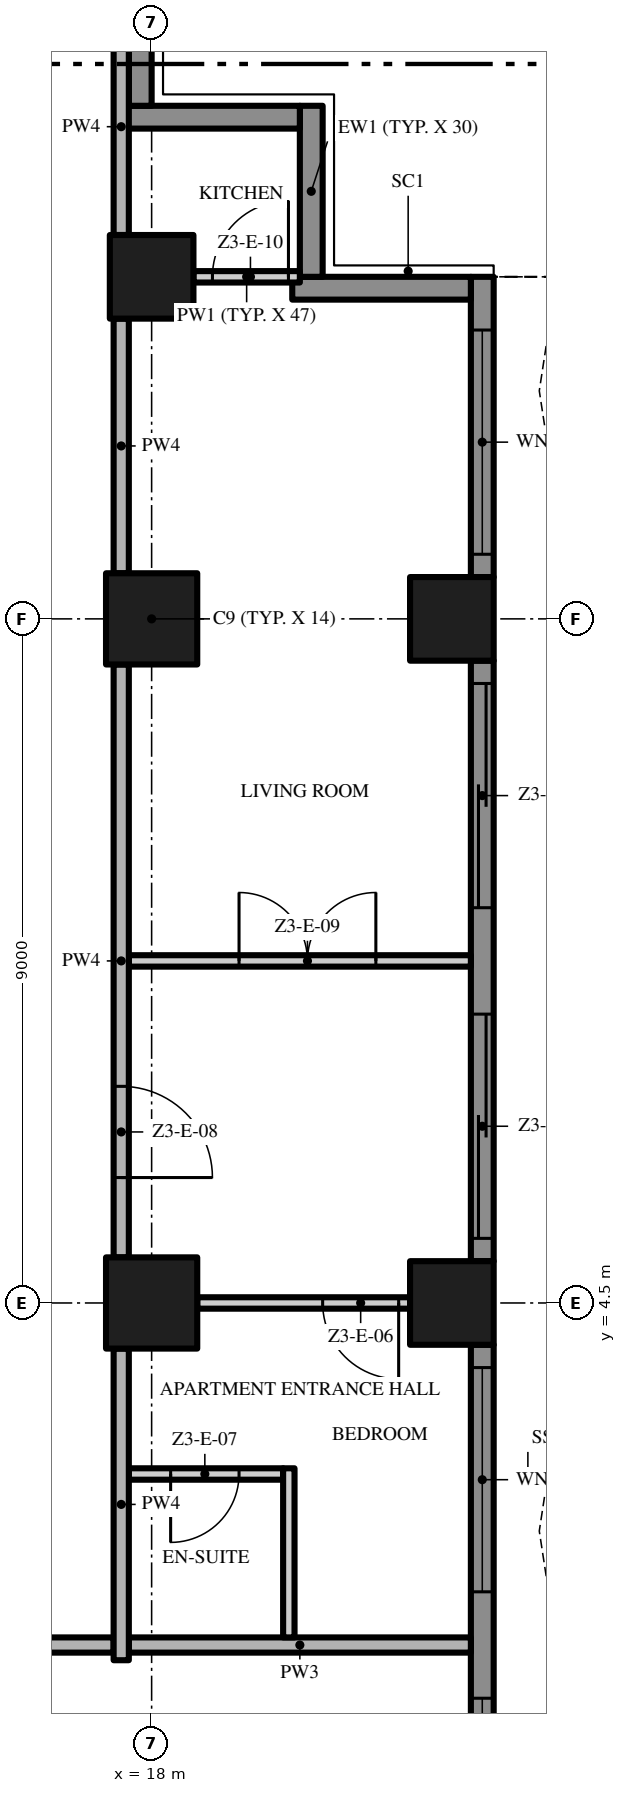
"""IFC4 building model, lengths in metres.
Left out: names, types, materials, properties, quantities, classifications, styles, units other than length and angle.
Written with IfcOpenShell. Run it as: python <this file> out.ifc"""

import sys

from ifc_helpers import new_model, si_unit, direction, frame, frame_2d, origin, origin_2d, place, context, subcontext, project, spatial, polyline, rectangle, outline, extrude, element, fill, save


model = new_model("IFC4")
c1 = context("Model", 3, precision=1e-05, world=origin(), true_north=direction((0.0, 1.0)))
c2 = subcontext(c1, "Body", "Model", "MODEL_VIEW")
j1 = project(units=[si_unit("LENGTHUNIT", "METRE"), si_unit("PLANEANGLEUNIT", "RADIAN")], contexts=[c1])
p1 = place(None, origin())
s1 = spatial("IfcSite", under=j1, at=p1, CompositionType="ELEMENT")
p2 = place(p1, origin())
s2 = spatial("IfcBuilding", under=s1, at=p2, CompositionType="ELEMENT")
p3 = place(p2, frame((0.0, 0.0, 166.8)))
s3 = spatial("IfcBuildingStorey", under=s2, at=p3, CompositionType="ELEMENT", Elevation=166.8)
for number, where, z_axis, x_axis in (
    (1, (18.0, 13.5, 0.0), (0.0, 0.0, 1.0), (1.0, 0.0, 0.0)),
    (2, (18.0, 4.5, 0.0), (0.0, 0.0, 1.0), (1.0, 0.0, 0.0)),
):
    element("IfcColumn", number, at=place(p3, frame(where, z_axis=z_axis, x_axis=x_axis)), inside=s3, PredefinedType="COLUMN", context=c2, shape_type="SweptSolid", body=[
        extrude(rectangle(XDim=1.2, YDim=1.2, at=origin_2d()), origin(), (0.0, 0.0, 1.0), 3.5),
    ])
for number, where, z_axis, x_axis in (
    (3, (21.95, 13.5, 0.0), (0.0, 0.0, 1.0), (1.0, 0.0, 0.0)),
    (4, (18.0, 18.0, 0.0), (0.0, 0.0, 1.0), (1.0, 0.0, 0.0)),
    (5, (21.95, 4.5, 0.0), (0.0, 0.0, 1.0), (1.0, 0.0, 0.0)),
):
    element("IfcColumn", number, at=place(p3, frame(where, z_axis=z_axis, x_axis=x_axis)), inside=s3, PredefinedType="COLUMN", context=c2, shape_type="SweptSolid", body=[
        extrude(rectangle(XDim=1.1, YDim=1.1, at=origin_2d()), origin(), (0.0, 0.0, 1.0), 3.5),
    ])
p4 = place(p3, frame((22.35, 3.95, 0.0), z_axis=(0.0, 0.0, 1.0), x_axis=(0.0, -1.0, 0.0)))
e6 = element("IfcWall", 6, at=p4, inside=s3, PredefinedType="SOLIDWALL", context=c2, shape_type="SweptSolid", body=[
    extrude(rectangle(XDim=7.9, YDim=0.3, at=frame_2d((3.95, 0.0))), origin(), (0.0, 0.0, 1.0), 3.5),
])
p5 = place(p4, frame((4.65, 0.0, 0.45)))
e7 = element("IfcOpeningElement", 7, at=p5, cuts=e6, PredefinedType="OPENING", context=c2, shape_type="SweptSolid", body=[
    extrude(rectangle(XDim=2.95, YDim=2.65, at=frame_2d((1.475, 1.325))), frame((0.0, 0.16, 0.0), z_axis=(0.0, -1.0, 0.0), x_axis=(1.0, 0.0, 0.0)), (0.0, 0.0, 1.0), 0.32),
])
p6 = place(p4, frame((0.3, 0.0, 0.45)))
e8 = element("IfcOpeningElement", 8, at=p6, cuts=e6, PredefinedType="OPENING", context=c2, shape_type="SweptSolid", body=[
    extrude(rectangle(XDim=2.95, YDim=2.65, at=frame_2d((1.475, 1.325))), frame((0.0, 0.16, 0.0), z_axis=(0.0, -1.0, 0.0), x_axis=(1.0, 0.0, 0.0)), (0.0, 0.0, 1.0), 0.32),
])
p7 = place(p3, frame((22.35, 12.95, 0.0), z_axis=(0.0, 0.0, 1.0), x_axis=(0.0, -1.0, 0.0)))
e9 = element("IfcWall", 9, at=p7, inside=s3, PredefinedType="SOLIDWALL", context=c2, shape_type="SweptSolid", body=[
    extrude(rectangle(XDim=7.9, YDim=0.3, at=frame_2d((3.95, 0.0))), origin(), (0.0, 0.0, 1.0), 3.5),
])
p8 = place(p7, frame((4.65, 0.0, 0.0)))
e10 = element("IfcOpeningElement", 10, at=p8, cuts=e9, PredefinedType="OPENING", context=c2, shape_type="SweptSolid", body=[
    extrude(rectangle(XDim=2.95, YDim=2.4, at=frame_2d((1.475, 1.2))), frame((0.0, 0.16, 0.0), z_axis=(0.0, -1.0, 0.0), x_axis=(1.0, 0.0, 0.0)), (0.0, 0.0, 1.0), 0.32),
])
p9 = place(p7, frame((0.3, 0.0, 0.0)))
e11 = element("IfcOpeningElement", 11, at=p9, cuts=e9, PredefinedType="OPENING", context=c2, shape_type="SweptSolid", body=[
    extrude(rectangle(XDim=2.95, YDim=2.4, at=frame_2d((1.475, 1.2))), frame((0.0, 0.16, 0.0), z_axis=(0.0, -1.0, 0.0), x_axis=(1.0, 0.0, 0.0)), (0.0, 0.0, 1.0), 0.32),
])
p10 = place(p3, frame((22.35, 18.0, 0.0), z_axis=(0.0, 0.0, 1.0), x_axis=(0.0, -1.0, 0.0)))
e12 = element("IfcWall", 12, at=p10, inside=s3, PredefinedType="SOLIDWALL", context=c2, shape_type="SweptSolid", body=[
    extrude(rectangle(XDim=3.95, YDim=0.3, at=frame_2d((1.975, 0.0))), origin(), (0.0, 0.0, 1.0), 3.5),
])
p11 = place(p10, frame((0.7, 0.0, 0.45)))
e13 = element("IfcOpeningElement", 13, at=p11, cuts=e12, PredefinedType="OPENING", context=c2, shape_type="SweptSolid", body=[
    extrude(rectangle(XDim=2.95, YDim=2.65, at=frame_2d((1.475, 1.325))), frame((0.0, 0.16, 0.0), z_axis=(0.0, -1.0, 0.0), x_axis=(1.0, 0.0, 0.0)), (0.0, 0.0, 1.0), 0.32),
])
p12 = place(p3, frame((19.85, 17.85, 0.0), z_axis=(0.0, 0.0, 1.0), x_axis=(1.0, 0.0, 0.0)))
e14 = element("IfcWall", 14, at=p12, inside=s3, PredefinedType="SOLIDWALL", context=c2, shape_type="SweptSolid", body=[
    extrude(rectangle(XDim=2.35, YDim=0.3, at=frame_2d((1.175, 0.0))), origin(), (0.0, 0.0, 1.0), 3.5),
])
p13 = place(p3, frame((20.1, 20.25, 0.0), z_axis=(0.0, 0.0, 1.0), x_axis=(0.0, -1.0, 0.0)))
e15 = element("IfcWall", 15, at=p13, inside=s3, PredefinedType="SOLIDWALL", context=c2, shape_type="SweptSolid", body=[
    extrude(rectangle(XDim=2.25, YDim=0.3, at=frame_2d((1.125, 0.0))), origin(), (0.0, 0.0, 1.0), 3.5),
])
p14 = place(p3, frame((17.6, 20.1, 0.0), z_axis=(0.0, 0.0, 1.0), x_axis=(1.0, 0.0, 0.0)))
e16 = element("IfcWall", 16, at=p14, inside=s3, PredefinedType="SOLIDWALL", context=c2, shape_type="SweptSolid", body=[
    extrude(rectangle(XDim=2.35, YDim=0.3, at=frame_2d((1.175, 0.0))), origin(), (0.0, 0.0, 1.0), 3.5),
])
p15 = place(p3, frame((17.85, 21.4, 0.0), z_axis=(0.0, 0.0, 1.0), x_axis=(0.0, -1.0, 0.0)))
e17 = element("IfcWall", 17, at=p15, inside=s3, PredefinedType="SOLIDWALL", context=c2, shape_type="SweptSolid", body=[
    extrude(rectangle(XDim=1.15, YDim=0.3, at=frame_2d((0.575, 0.0))), origin(), (0.0, 0.0, 1.0), 3.5),
])
p16 = place(p3, origin())
e18 = element("IfcWall", 18, at=p16, inside=s3, PredefinedType="USERDEFINED", context=c2, shape_type="SweptSolid", body=[
    extrude(outline(polyline([(23.1, -13.5), (23.329, -12.0), (23.929, -10.5), (24.671, -9.0), (25.271, -7.5), (25.5, -6.0), (25.271, -4.5), (24.671, -3.0), (23.929, -1.5), (23.329, 0.0), (23.1, 1.5), (23.329, 3.0), (23.929, 4.5), (24.671, 6.0), (25.271, 7.5), (25.5, 9.0), (25.271, 10.5), (24.671, 12.0), (23.929, 13.5), (23.329, 15.0), (23.1, 16.5), (23.329, 18.0), (23.082, 18.038), (22.847, 16.5), (23.086, 14.934), (23.701, 13.398), (24.442, 11.898), (25.028, 10.434), (25.247, 9.0), (25.028, 7.566), (24.442, 6.102), (23.701, 4.602), (23.086, 3.066), (22.847, 1.5), (23.086, -0.066), (23.701, -1.602), (24.442, -3.102), (25.028, -4.566), (25.247, -6.0), (25.028, -7.434), (24.442, -8.898), (23.701, -10.398), (23.086, -11.934), (22.853, -13.462), (23.1, -13.5)])), origin(), (0.0, 0.0, 1.0), 0.9),
])
p17 = place(p3, frame((17.5, 0.0, 0.0), z_axis=(0.0, 0.0, 1.0), x_axis=(-1.0, 0.0, 0.0)))
e19 = element("IfcWall", 19, at=p17, inside=s3, PredefinedType="PARTITIONING", context=c2, shape_type="SweptSolid", body=[
    extrude(rectangle(XDim=35.0, YDim=0.2, at=frame_2d((17.5, 0.0))), origin(), (0.0, 0.0, 1.0), 3.5),
])
p18 = place(p17, frame((16.75, 0.0, 0.0)))
e20 = element("IfcOpeningElement", 20, at=p18, cuts=e19, PredefinedType="OPENING", context=c2, shape_type="SweptSolid", body=[
    extrude(rectangle(XDim=1.5, YDim=2.4, at=frame_2d((0.75, 1.2))), frame((0.0, 0.11, 0.0), z_axis=(0.0, -1.0, 0.0), x_axis=(1.0, 0.0, 0.0)), (0.0, 0.0, 1.0), 0.22),
])
p19 = place(p3, frame((17.7, 0.0, 0.0), z_axis=(0.0, 0.0, 1.0), x_axis=(1.0, 0.0, 0.0)))
e21 = element("IfcWall", 21, at=p19, inside=s3, PredefinedType="PARTITIONING", context=c2, shape_type="SweptSolid", body=[
    extrude(rectangle(XDim=4.5, YDim=0.2, at=frame_2d((2.25, 0.0))), origin(), (0.0, 0.0, 1.0), 3.5),
])
p20 = place(p3, frame((19.73, 2.25, 0.0), z_axis=(0.0, 0.0, 1.0), x_axis=(-1.0, 0.0, 0.0)))
e22 = element("IfcWall", 22, at=p20, inside=s3, PredefinedType="PARTITIONING", context=c2, shape_type="SweptSolid", body=[
    extrude(rectangle(XDim=2.03, YDim=0.15, at=frame_2d((1.015, 0.0))), origin(), (0.0, 0.0, 1.0), 3.5),
])
p21 = place(p20, frame((0.58, 0.0, 0.0)))
e23 = element("IfcOpeningElement", 23, at=p21, cuts=e22, PredefinedType="OPENING", context=c2, shape_type="SweptSolid", body=[
    extrude(rectangle(XDim=0.9, YDim=2.1, at=frame_2d((0.45, 1.05))), frame((0.0, 0.085, 0.0), z_axis=(0.0, -1.0, 0.0), x_axis=(1.0, 0.0, 0.0)), (0.0, 0.0, 1.0), 0.17),
])
p22 = place(p3, frame((21.4, 4.5, 0.0), z_axis=(0.0, 0.0, 1.0), x_axis=(-1.0, 0.0, 0.0)))
e24 = element("IfcWall", 24, at=p22, inside=s3, PredefinedType="PARTITIONING", context=c2, shape_type="SweptSolid", body=[
    extrude(rectangle(XDim=2.8, YDim=0.15, at=frame_2d((1.4, 0.0))), origin(), (0.0, 0.0, 1.0), 3.5),
])
p23 = place(p22, frame((0.15, 0.0, 0.0)))
e25 = element("IfcOpeningElement", 25, at=p23, cuts=e24, PredefinedType="OPENING", context=c2, shape_type="SweptSolid", body=[
    extrude(rectangle(XDim=1.0, YDim=2.4, at=frame_2d((0.5, 1.2))), frame((0.0, 0.085, 0.0), z_axis=(0.0, -1.0, 0.0), x_axis=(1.0, 0.0, 0.0)), (0.0, 0.0, 1.0), 0.17),
])
p24 = place(p3, frame((17.7, 9.0, 0.0), z_axis=(0.0, 0.0, 1.0), x_axis=(1.0, 0.0, 0.0)))
e26 = element("IfcWall", 26, at=p24, inside=s3, PredefinedType="PARTITIONING", context=c2, shape_type="SweptSolid", body=[
    extrude(rectangle(XDim=4.5, YDim=0.15, at=frame_2d((2.25, 0.0))), origin(), (0.0, 0.0, 1.0), 3.5),
])
p25 = place(p24, frame((1.45, 0.0, 0.0)))
e27 = element("IfcOpeningElement", 27, at=p25, cuts=e26, PredefinedType="OPENING", context=c2, shape_type="SweptSolid", body=[
    extrude(rectangle(XDim=1.8, YDim=2.4, at=frame_2d((0.9, 1.2))), frame((0.0, 0.085, 0.0), z_axis=(0.0, -1.0, 0.0), x_axis=(1.0, 0.0, 0.0)), (0.0, 0.0, 1.0), 0.17),
])
p26 = place(p3, frame((18.55, 18.0, 0.0), z_axis=(0.0, 0.0, 1.0), x_axis=(1.0, 0.0, 0.0)))
e28 = element("IfcWall", 28, at=p26, inside=s3, PredefinedType="PARTITIONING", context=c2, shape_type="SweptSolid", body=[
    extrude(rectangle(XDim=1.4, YDim=0.15, at=frame_2d((0.7, 0.0))), origin(), (0.0, 0.0, 1.0), 3.5),
])
p27 = place(p26, frame((0.25, 0.0, 0.0)))
e29 = element("IfcOpeningElement", 29, at=p27, cuts=e28, PredefinedType="OPENING", context=c2, shape_type="SweptSolid", body=[
    extrude(rectangle(XDim=1.0, YDim=2.4, at=frame_2d((0.5, 1.2))), frame((0.0, 0.085, 0.0), z_axis=(0.0, -1.0, 0.0), x_axis=(1.0, 0.0, 0.0)), (0.0, 0.0, 1.0), 0.17),
])
p28 = place(p3, frame((17.6, -0.2, 0.0), z_axis=(0.0, 0.0, 1.0), x_axis=(0.0, 1.0, 0.0)))
e30 = element("IfcWall", 30, at=p28, inside=s3, PredefinedType="PARTITIONING", context=c2, shape_type="SweptSolid", body=[
    extrude(rectangle(XDim=4.1, YDim=0.2, at=frame_2d((2.05, 0.0))), origin(), (0.0, 0.0, 1.0), 3.5),
])
p29 = place(p3, frame((17.6, 12.9, 0.0), z_axis=(0.0, 0.0, 1.0), x_axis=(0.0, -1.0, 0.0)))
e31 = element("IfcWall", 31, at=p29, inside=s3, PredefinedType="PARTITIONING", context=c2, shape_type="SweptSolid", body=[
    extrude(rectangle(XDim=7.8, YDim=0.2, at=frame_2d((3.9, 0.0))), origin(), (0.0, 0.0, 1.0), 3.5),
])
p30 = place(p29, frame((5.55, 0.0, 0.0)))
e32 = element("IfcOpeningElement", 32, at=p30, cuts=e31, PredefinedType="OPENING", context=c2, shape_type="SweptSolid", body=[
    extrude(rectangle(XDim=1.2, YDim=2.4, at=frame_2d((0.6, 1.2))), frame((0.0, 0.11, 0.0), z_axis=(0.0, -1.0, 0.0), x_axis=(1.0, 0.0, 0.0)), (0.0, 0.0, 1.0), 0.22),
])
p31 = place(p3, frame((17.6, 14.1, 0.0), z_axis=(0.0, 0.0, 1.0), x_axis=(0.0, 1.0, 0.0)))
e33 = element("IfcWall", 33, at=p31, inside=s3, PredefinedType="PARTITIONING", context=c2, shape_type="SweptSolid", body=[
    extrude(rectangle(XDim=3.35, YDim=0.2, at=frame_2d((1.675, 0.0))), origin(), (0.0, 0.0, 1.0), 3.5),
])
p32 = place(p3, frame((17.6, 18.55, 0.0), z_axis=(0.0, 0.0, 1.0), x_axis=(0.0, 1.0, 0.0)))
e34 = element("IfcWall", 34, at=p32, inside=s3, PredefinedType="PARTITIONING", context=c2, shape_type="SweptSolid", body=[
    extrude(rectangle(XDim=2.85, YDim=0.2, at=frame_2d((1.425, 0.0))), origin(), (0.0, 0.0, 1.0), 3.5),
])
p33 = place(p3, frame((19.805, 0.1, 0.0), z_axis=(0.0, 0.0, 1.0), x_axis=(0.0, 1.0, 0.0)))
e35 = element("IfcWall", 35, at=p33, inside=s3, PredefinedType="PARTITIONING", context=c2, shape_type="SweptSolid", body=[
    extrude(rectangle(XDim=2.225, YDim=0.15, at=frame_2d((1.113, 0.0))), origin(), (0.0, 0.0, 1.0), 3.5),
])
p34 = place(p5, origin())
e36 = element("IfcWindow", 36, at=p34, inside=s3, PartitioningType="SINGLE_PANEL", PredefinedType="WINDOW", context=c2, shape_type="SweptSolid", body=[
    extrude(rectangle(XDim=2.95, YDim=2.65, at=frame_2d((1.475, 1.325))), frame((0.0, 0.03, 0.0), z_axis=(0.0, -1.0, 0.0), x_axis=(1.0, 0.0, 0.0)), (0.0, 0.0, 1.0), 0.06),
])
fill(e7, e36)
p35 = place(p6, origin())
e37 = element("IfcWindow", 37, at=p35, inside=s3, PartitioningType="SINGLE_PANEL", PredefinedType="WINDOW", context=c2, shape_type="SweptSolid", body=[
    extrude(rectangle(XDim=2.95, YDim=2.65, at=frame_2d((1.475, 1.325))), frame((0.0, 0.03, 0.0), z_axis=(0.0, -1.0, 0.0), x_axis=(1.0, 0.0, 0.0)), (0.0, 0.0, 1.0), 0.06),
])
fill(e8, e37)
p36 = place(p8, origin())
e38 = element("IfcDoor", 38, at=p36, inside=s3, OperationType="SINGLE_SWING_LEFT", PredefinedType="DOOR", context=c2, shape_type="SweptSolid", body=[
    extrude(rectangle(XDim=2.95, YDim=2.4, at=frame_2d((1.475, 1.2))), frame((0.0, 0.025, 0.0), z_axis=(0.0, -1.0, 0.0), x_axis=(1.0, 0.0, 0.0)), (0.0, 0.0, 1.0), 0.05),
])
fill(e10, e38)
p37 = place(p9, origin())
e39 = element("IfcDoor", 39, at=p37, inside=s3, OperationType="SINGLE_SWING_LEFT", PredefinedType="DOOR", context=c2, shape_type="SweptSolid", body=[
    extrude(rectangle(XDim=2.95, YDim=2.4, at=frame_2d((1.475, 1.2))), frame((0.0, 0.025, 0.0), z_axis=(0.0, -1.0, 0.0), x_axis=(1.0, 0.0, 0.0)), (0.0, 0.0, 1.0), 0.05),
])
fill(e11, e39)
p38 = place(p11, origin())
e40 = element("IfcWindow", 40, at=p38, inside=s3, PartitioningType="SINGLE_PANEL", PredefinedType="WINDOW", context=c2, shape_type="SweptSolid", body=[
    extrude(rectangle(XDim=2.95, YDim=2.65, at=frame_2d((1.475, 1.325))), frame((0.0, 0.03, 0.0), z_axis=(0.0, -1.0, 0.0), x_axis=(1.0, 0.0, 0.0)), (0.0, 0.0, 1.0), 0.06),
])
fill(e13, e40)
p39 = place(p23, origin())
e41 = element("IfcDoor", 41, at=p39, inside=s3, OperationType="SINGLE_SWING_LEFT", PredefinedType="DOOR", context=c2, shape_type="SweptSolid", body=[
    extrude(rectangle(XDim=1.0, YDim=2.4, at=frame_2d((0.5, 1.2))), frame((0.0, 0.025, 0.0), z_axis=(0.0, -1.0, 0.0), x_axis=(1.0, 0.0, 0.0)), (0.0, 0.0, 1.0), 0.05),
])
fill(e25, e41)
p40 = place(p21, origin())
e42 = element("IfcDoor", 42, at=p40, inside=s3, OperationType="SINGLE_SWING_RIGHT", PredefinedType="DOOR", context=c2, shape_type="SweptSolid", body=[
    extrude(rectangle(XDim=0.9, YDim=2.1, at=frame_2d((0.45, 1.05))), frame((0.0, 0.025, 0.0), z_axis=(0.0, -1.0, 0.0), x_axis=(1.0, 0.0, 0.0)), (0.0, 0.0, 1.0), 0.05),
])
fill(e23, e42)
p41 = place(p30, origin())
e43 = element("IfcDoor", 43, at=p41, inside=s3, OperationType="SINGLE_SWING_RIGHT", PredefinedType="DOOR", context=c2, shape_type="SweptSolid", body=[
    extrude(rectangle(XDim=1.2, YDim=2.4, at=frame_2d((0.6, 1.2))), frame((0.0, 0.025, 0.0), z_axis=(0.0, -1.0, 0.0), x_axis=(1.0, 0.0, 0.0)), (0.0, 0.0, 1.0), 0.05),
])
fill(e32, e43)
p42 = place(p25, origin())
e44 = element("IfcDoor", 44, at=p42, inside=s3, OperationType="DOUBLE_DOOR_SINGLE_SWING", PredefinedType="DOOR", context=c2, shape_type="SweptSolid", body=[
    extrude(rectangle(XDim=1.8, YDim=2.4, at=frame_2d((0.9, 1.2))), frame((0.0, 0.025, 0.0), z_axis=(0.0, -1.0, 0.0), x_axis=(1.0, 0.0, 0.0)), (0.0, 0.0, 1.0), 0.05),
])
fill(e27, e44)
p43 = place(p27, origin())
e45 = element("IfcDoor", 45, at=p43, inside=s3, OperationType="SINGLE_SWING_RIGHT", PredefinedType="DOOR", context=c2, shape_type="SweptSolid", body=[
    extrude(rectangle(XDim=1.0, YDim=2.4, at=frame_2d((0.5, 1.2))), frame((0.0, 0.025, 0.0), z_axis=(0.0, -1.0, 0.0), x_axis=(1.0, 0.0, 0.0)), (0.0, 0.0, 1.0), 0.05),
])
fill(e29, e45)
save(model, sys.argv[1])
